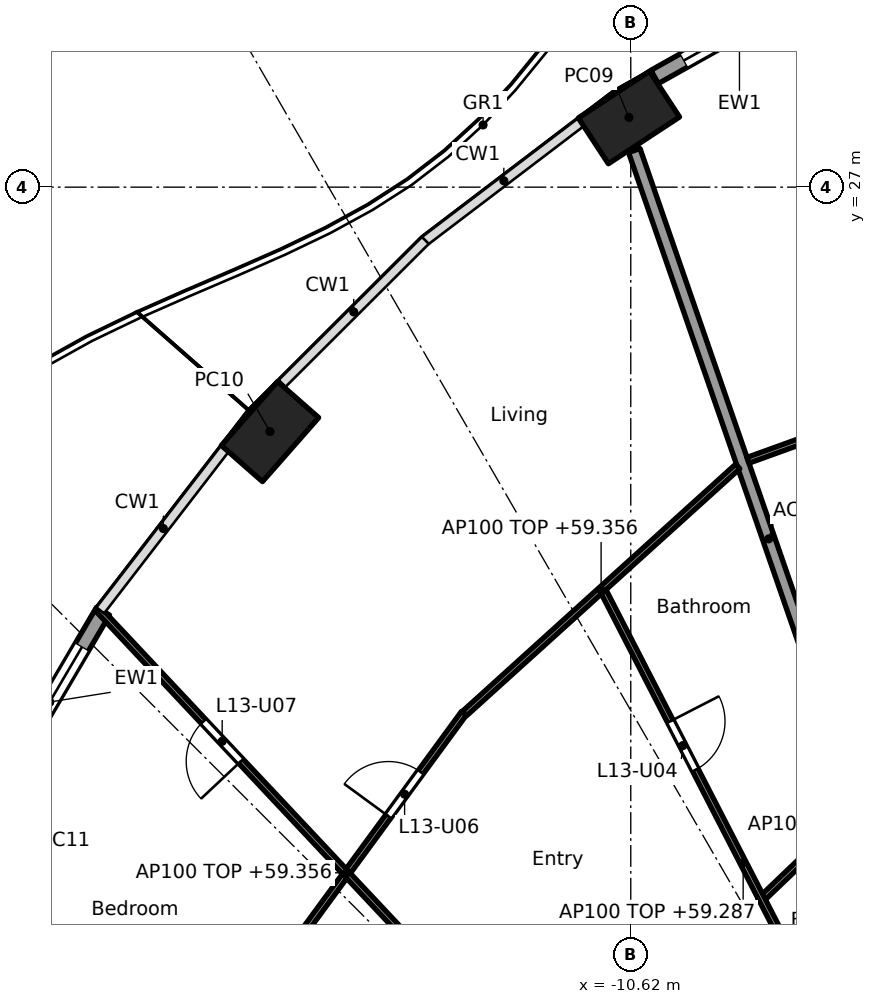
"""IFC4 building model, lengths in metres.
Left out: names, types, materials, properties, quantities, classifications, styles, units other than length and angle.
Written with IfcOpenShell. Run it as: python <this file> out.ifc"""

import sys

from ifc_helpers import new_model, si_unit, direction, frame, frame_2d, origin, origin_2d, place, context, subcontext, project, spatial, rectangle, hollow_rectangle, extrude, element, fill, save


model = new_model("IFC4")
c1 = context("Model", 3, precision=1e-05, world=origin(), true_north=direction((0.0, 1.0)))
c2 = subcontext(c1, "Body", "Model", "MODEL_VIEW")
j1 = project(units=[si_unit("LENGTHUNIT", "METRE"), si_unit("PLANEANGLEUNIT", "RADIAN")], contexts=[c1])
p1 = place(None, origin())
s1 = spatial("IfcSite", under=j1, at=p1, CompositionType="ELEMENT")
p2 = place(p1, origin())
s2 = spatial("IfcBuilding", under=s1, at=p2, CompositionType="ELEMENT")
p3 = place(p2, frame((0.0, 0.0, 56.6)))
s3 = spatial("IfcBuildingStorey", under=s2, at=p3, CompositionType="ELEMENT", Elevation=56.6)
for number, where, z_axis, x_axis in (
    (1, (-10.65, 28.146, 0.0), (0.0, 0.0, 1.0), (-0.836, -0.549, 0.0)),
    (2, (-16.552, 22.981, 0.0), (0.0, 0.0, 1.0), (-0.66, -0.751, 0.0)),
):
    element("IfcColumn", number, at=place(p3, frame(where, z_axis=z_axis, x_axis=x_axis)), inside=s3, PredefinedType="COLUMN", context=c2, shape_type="SweptSolid", body=[
        extrude(hollow_rectangle(XDim=1.4, YDim=0.9, WallThickness=0.05, at=origin_2d()), origin(), (0.0, 0.0, 1.0), 3.7),
    ])
p4 = place(p3, frame((-10.228, 28.812, 0.0), z_axis=(0.0, 0.0, 1.0), x_axis=(0.872084295691, 0.489355679653, 0.0)))
e3 = element("IfcWall", 3, at=p4, inside=s3, PredefinedType="SOLIDWALL", context=c2, shape_type="SweptSolid", body=[
    extrude(rectangle(XDim=3.201, YDim=0.25, at=frame_2d((1.601, 0.0))), origin(), (0.0, 0.0, 1.0), 3.44),
])
p5 = place(p4, frame((0.551, 0.0, 0.0)))
e4 = element("IfcOpeningElement", 4, at=p5, cuts=e3, PredefinedType="OPENING", context=c2, shape_type="SweptSolid", body=[
    extrude(rectangle(XDim=2.1, YDim=2.4, at=frame_2d((1.05, 1.2))), frame((0.0, 0.135, 0.0), z_axis=(0.0, -1.0, 0.0), x_axis=(1.0, 0.0, 0.0)), (0.0, 0.0, 1.0), 0.27),
])
p6 = place(p3, frame((-21.052, 17.04, 0.0), z_axis=(0.0, 0.0, 1.0), x_axis=(0.506311160839, 0.862350861546, 0.0)))
e5 = element("IfcWall", 5, at=p6, inside=s3, PredefinedType="SOLIDWALL", context=c2, shape_type="SweptSolid", body=[
    extrude(rectangle(XDim=3.462, YDim=0.25, at=frame_2d((1.731, 0.0))), origin(), (0.0, 0.0, 1.0), 3.44),
])
p7 = place(p6, frame((0.681, 0.0, 0.0)))
e6 = element("IfcOpeningElement", 6, at=p7, cuts=e5, PredefinedType="OPENING", context=c2, shape_type="SweptSolid", body=[
    extrude(rectangle(XDim=2.1, YDim=2.4, at=frame_2d((1.05, 1.2))), frame((0.0, 0.135, 0.0), z_axis=(0.0, -1.0, 0.0), x_axis=(1.0, 0.0, 0.0)), (0.0, 0.0, 1.0), 0.27),
])
p8 = place(p3, frame((-6.139, 14.829, 0.0), z_axis=(0.0, 0.0, 1.0), x_axis=(-0.327178799566, 0.944962450637, 0.0)))
e7 = element("IfcWall", 7, at=p8, inside=s3, PredefinedType="PARTITIONING", context=c2, shape_type="SweptSolid", body=[
    extrude(rectangle(XDim=13.517, YDim=0.2, at=frame_2d((6.759, 0.0))), origin(), (0.0, 0.0, 1.0), 2.756),
])
p9 = place(p3, frame((-3.128, 24.521, 0.0), z_axis=(0.0, 0.0, 1.0), x_axis=(-0.940401494588, -0.340066212636, 0.0)))
e8 = element("IfcWall", 8, at=p9, inside=s3, PredefinedType="PARTITIONING", context=c2, shape_type="SweptSolid", body=[
    extrude(rectangle(XDim=5.917, YDim=0.1, at=frame_2d((2.958, 0.0))), origin(), (0.0, 0.0, 1.0), 2.756),
])
p10 = place(p9, frame((2.509, 0.0, 0.0)))
e9 = element("IfcOpeningElement", 9, at=p10, cuts=e8, PredefinedType="OPENING", context=c2, shape_type="SweptSolid", body=[
    extrude(rectangle(XDim=0.9, YDim=2.1, at=frame_2d((0.45, 1.05))), frame((0.0, 0.06, 0.0), z_axis=(0.0, -1.0, 0.0), x_axis=(1.0, 0.0, 0.0)), (0.0, 0.0, 1.0), 0.12),
])
p11 = place(p3, frame((-6.912, 16.782, 0.0), z_axis=(0.0, 0.0, 1.0), x_axis=(-0.722789289931, -0.691068478778, 0.0)))
e10 = element("IfcWall", 10, at=p11, inside=s3, PredefinedType="PARTITIONING", context=c2, shape_type="SweptSolid", body=[
    extrude(rectangle(XDim=2.194, YDim=0.1, at=frame_2d((1.097, 0.0))), origin(), (0.0, 0.0, 1.0), 3.44),
])
p12 = place(p3, frame((-8.861, 22.407, 0.0), z_axis=(0.0, 0.0, 1.0), x_axis=(-0.741713303551, -0.670717060567, 0.0)))
e11 = element("IfcWall", 11, at=p12, inside=s3, PredefinedType="PARTITIONING", context=c2, shape_type="SweptSolid", body=[
    extrude(rectangle(XDim=6.059, YDim=0.1, at=frame_2d((3.03, 0.0))), origin(), (0.0, 0.0, 1.0), 2.756),
])
p13 = place(p3, frame((-6.477, 11.427, 0.0), z_axis=(0.0, 0.0, 1.0), x_axis=(-0.457464037982, 0.889228122561, 0.0)))
e12 = element("IfcWall", 12, at=p13, inside=s3, PredefinedType="PARTITIONING", context=c2, shape_type="SweptSolid", body=[
    extrude(rectangle(XDim=10.032, YDim=0.1, at=frame_2d((5.016, 0.0))), origin(), (0.0, 0.0, 1.0), 2.687),
])
p14 = place(p13, frame((0.35, 0.0, 0.0)))
e13 = element("IfcOpeningElement", 13, at=p14, cuts=e12, PredefinedType="OPENING", context=c2, shape_type="SweptSolid", body=[
    extrude(rectangle(XDim=0.9, YDim=2.1, at=frame_2d((0.45, 1.05))), frame((0.0, 0.06, 0.0), z_axis=(0.0, -1.0, 0.0), x_axis=(1.0, 0.0, 0.0)), (0.0, 0.0, 1.0), 0.12),
])
p15 = place(p13, frame((6.735, 0.0, 0.0)))
e14 = element("IfcOpeningElement", 14, at=p15, cuts=e12, PredefinedType="OPENING", context=c2, shape_type="SweptSolid", body=[
    extrude(rectangle(XDim=0.9, YDim=2.1, at=frame_2d((0.45, 1.05))), frame((0.0, 0.06, 0.0), z_axis=(0.0, -1.0, 0.0), x_axis=(1.0, 0.0, 0.0)), (0.0, 0.0, 1.0), 0.12),
])
p16 = place(p3, frame((-13.362, 18.35, 0.0), z_axis=(0.0, 0.0, 1.0), x_axis=(-0.591191311491, -0.806531359104, 0.0)))
e15 = element("IfcWall", 15, at=p16, inside=s3, PredefinedType="PARTITIONING", context=c2, shape_type="SweptSolid", body=[
    extrude(rectangle(XDim=6.51, YDim=0.1, at=frame_2d((3.255, 0.0))), origin(), (0.0, 0.0, 1.0), 2.756),
])
p17 = place(p16, frame((1.202, 0.0, 0.0)))
e16 = element("IfcOpeningElement", 16, at=p17, cuts=e15, PredefinedType="OPENING", context=c2, shape_type="SweptSolid", body=[
    extrude(rectangle(XDim=0.9, YDim=2.1, at=frame_2d((0.45, 1.05))), frame((0.0, 0.06, 0.0), z_axis=(0.0, -1.0, 0.0), x_axis=(1.0, 0.0, 0.0)), (0.0, 0.0, 1.0), 0.12),
])
p18 = place(p3, frame((-8.953, 8.958, 0.0), z_axis=(0.0, 0.0, 1.0), x_axis=(-0.684574307023, 0.728943082939, 0.0)))
e17 = element("IfcWall", 17, at=p18, inside=s3, PredefinedType="PARTITIONING", context=c2, shape_type="SweptSolid", body=[
    extrude(rectangle(XDim=15.231, YDim=0.1, at=frame_2d((7.615, 0.0))), origin(), (0.0, 0.0, 1.0), 2.687),
])
p19 = place(p18, frame((1.54, 0.0, 0.0)))
e18 = element("IfcOpeningElement", 18, at=p19, cuts=e17, PredefinedType="OPENING", context=c2, shape_type="SweptSolid", body=[
    extrude(rectangle(XDim=0.9, YDim=2.1, at=frame_2d((0.45, 1.05))), frame((0.0, 0.06, 0.0), z_axis=(0.0, -1.0, 0.0), x_axis=(1.0, 0.0, 0.0)), (0.0, 0.0, 1.0), 0.12),
])
p20 = place(p18, frame((6.174, 0.0, 0.0)))
e19 = element("IfcOpeningElement", 19, at=p20, cuts=e17, PredefinedType="OPENING", context=c2, shape_type="SweptSolid", body=[
    extrude(rectangle(XDim=0.9, YDim=2.1, at=frame_2d((0.45, 1.05))), frame((0.0, 0.06, 0.0), z_axis=(0.0, -1.0, 0.0), x_axis=(1.0, 0.0, 0.0)), (0.0, 0.0, 1.0), 0.12),
])
p21 = place(p18, frame((11.8, 0.0, 0.0)))
e20 = element("IfcOpeningElement", 20, at=p21, cuts=e17, PredefinedType="OPENING", context=c2, shape_type="SweptSolid", body=[
    extrude(rectangle(XDim=0.9, YDim=2.1, at=frame_2d((0.45, 1.05))), frame((0.0, 0.06, 0.0), z_axis=(0.0, -1.0, 0.0), x_axis=(1.0, 0.0, 0.0)), (0.0, 0.0, 1.0), 0.12),
])
p22 = place(p5, origin())
e21 = element("IfcDoor", 21, at=p22, inside=s3, OperationType="SLIDING_TO_LEFT", PredefinedType="DOOR", context=c2, shape_type="SweptSolid", body=[
    extrude(rectangle(XDim=2.1, YDim=2.4, at=frame_2d((1.05, 1.2))), frame((0.0, 0.025, 0.0), z_axis=(0.0, -1.0, 0.0), x_axis=(1.0, 0.0, 0.0)), (0.0, 0.0, 1.0), 0.05),
])
fill(e4, e21)
p23 = place(p7, origin())
e22 = element("IfcDoor", 22, at=p23, inside=s3, OperationType="SLIDING_TO_LEFT", PredefinedType="DOOR", context=c2, shape_type="SweptSolid", body=[
    extrude(rectangle(XDim=2.1, YDim=2.4, at=frame_2d((1.05, 1.2))), frame((0.0, 0.025, 0.0), z_axis=(0.0, -1.0, 0.0), x_axis=(1.0, 0.0, 0.0)), (0.0, 0.0, 1.0), 0.05),
])
fill(e6, e22)
p24 = place(p15, frame((0.9, 0.0, 0.0), x_axis=(-1.0, 0.0, 0.0)))
e23 = element("IfcDoor", 23, at=p24, inside=s3, OperationType="SINGLE_SWING_LEFT", PredefinedType="DOOR", context=c2, shape_type="SweptSolid", body=[
    extrude(rectangle(XDim=0.9, YDim=2.1, at=frame_2d((0.45, 1.05))), frame((0.0, 0.025, 0.0), z_axis=(0.0, -1.0, 0.0), x_axis=(1.0, 0.0, 0.0)), (0.0, 0.0, 1.0), 0.05),
])
fill(e14, e23)
p25 = place(p17, frame((0.9, 0.0, 0.0), x_axis=(-1.0, 0.0, 0.0)))
e24 = element("IfcDoor", 24, at=p25, inside=s3, OperationType="SINGLE_SWING_LEFT", PredefinedType="DOOR", context=c2, shape_type="SweptSolid", body=[
    extrude(rectangle(XDim=0.9, YDim=2.1, at=frame_2d((0.45, 1.05))), frame((0.0, 0.025, 0.0), z_axis=(0.0, -1.0, 0.0), x_axis=(1.0, 0.0, 0.0)), (0.0, 0.0, 1.0), 0.05),
])
fill(e16, e24)
p26 = place(p21, origin())
e25 = element("IfcDoor", 25, at=p26, inside=s3, OperationType="SINGLE_SWING_LEFT", PredefinedType="DOOR", context=c2, shape_type="SweptSolid", body=[
    extrude(rectangle(XDim=0.9, YDim=2.1, at=frame_2d((0.45, 1.05))), frame((0.0, 0.025, 0.0), z_axis=(0.0, -1.0, 0.0), x_axis=(1.0, 0.0, 0.0)), (0.0, 0.0, 1.0), 0.05),
])
fill(e20, e25)
save(model, sys.argv[1])
